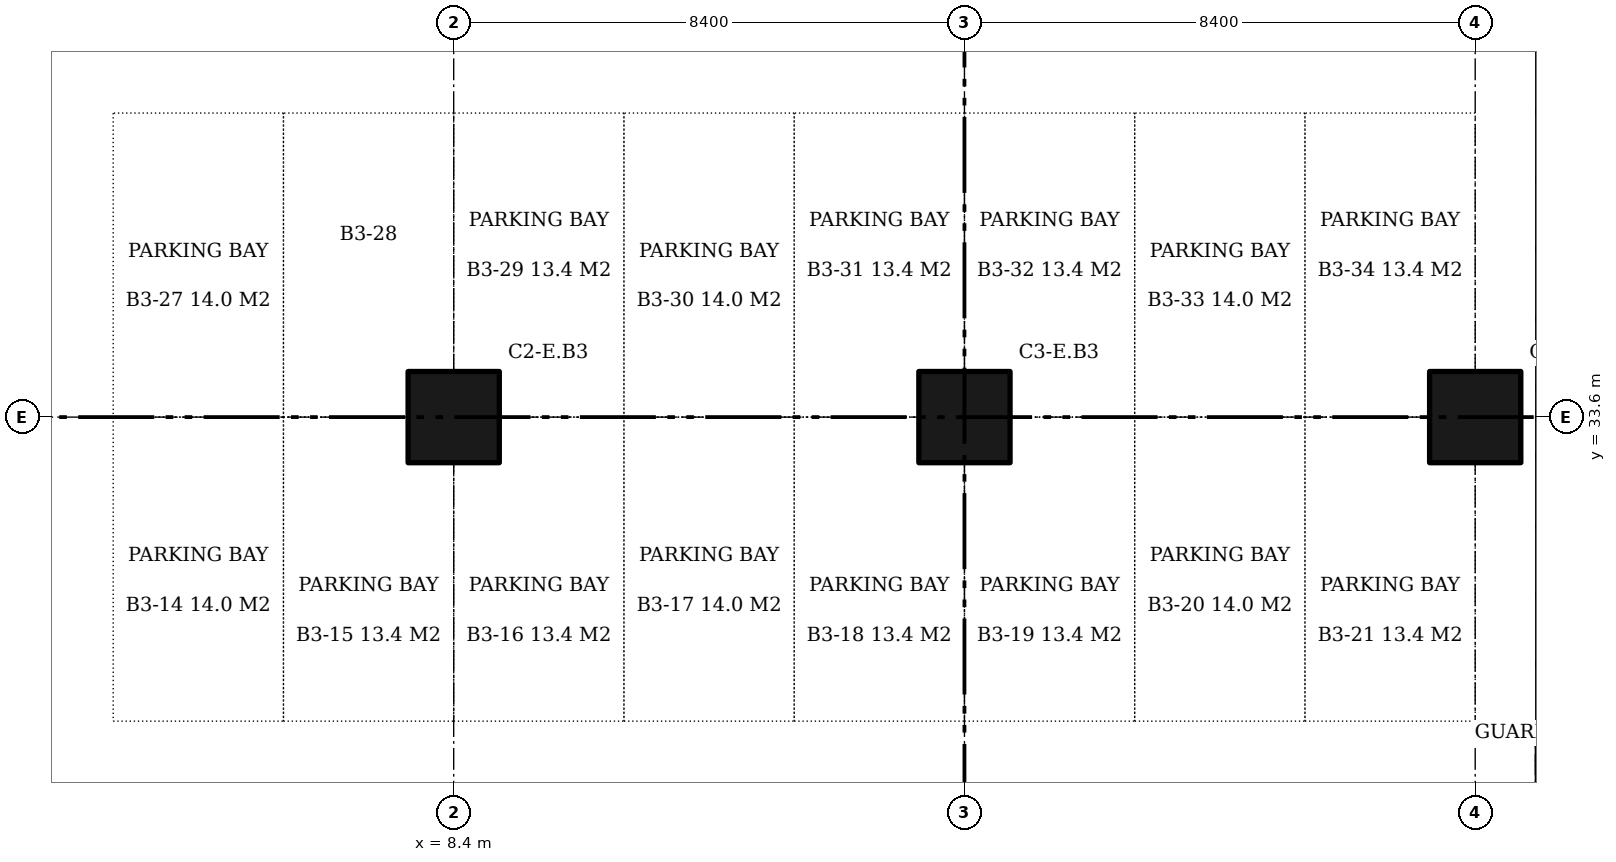
"""IFC4 building model, lengths in metres.
Left out: names, types, materials, properties, quantities, classifications, styles, units other than length and angle.
Written with IfcOpenShell. Run it as: python <this file> out.ifc"""

import sys

from ifc_helpers import new_model, si_unit, direction, frame, origin, origin_2d, place, context, subcontext, project, spatial, rectangle, extrude, element, save


model = new_model("IFC4")
c1 = context("Model", 3, precision=1e-05, world=origin(), true_north=direction((0.0, 1.0)))
c2 = subcontext(c1, "Body", "Model", "MODEL_VIEW")
j1 = project(units=[si_unit("LENGTHUNIT", "METRE"), si_unit("PLANEANGLEUNIT", "RADIAN")], contexts=[c1])
p1 = place(None, origin())
s1 = spatial("IfcSite", under=j1, at=p1, CompositionType="ELEMENT")
p2 = place(p1, origin())
s2 = spatial("IfcBuilding", under=s1, at=p2, CompositionType="ELEMENT")
p3 = place(p2, frame((0.0, 0.0, -12.0)))
s3 = spatial("IfcBuildingStorey", under=s2, at=p3, CompositionType="ELEMENT", Elevation=-12.0)
for number, where, z_axis, x_axis in (
    (1, (8.4, 33.6, 0.0), (0.0, 0.0, 1.0), (1.0, 0.0, 0.0)),
    (2, (16.8, 33.6, 0.0), (0.0, 0.0, 1.0), (1.0, 0.0, 0.0)),
    (3, (25.2, 33.6, 0.0), (0.0, 0.0, 1.0), (1.0, 0.0, 0.0)),
):
    element("IfcColumn", number, at=place(p3, frame(where, z_axis=z_axis, x_axis=x_axis)), inside=s3, PredefinedType="COLUMN", context=c2, shape_type="SweptSolid", body=[
        extrude(rectangle(XDim=1.5, YDim=1.5, at=origin_2d()), origin(), (0.0, 0.0, 1.0), 3.7),
    ])
save(model, sys.argv[1])
